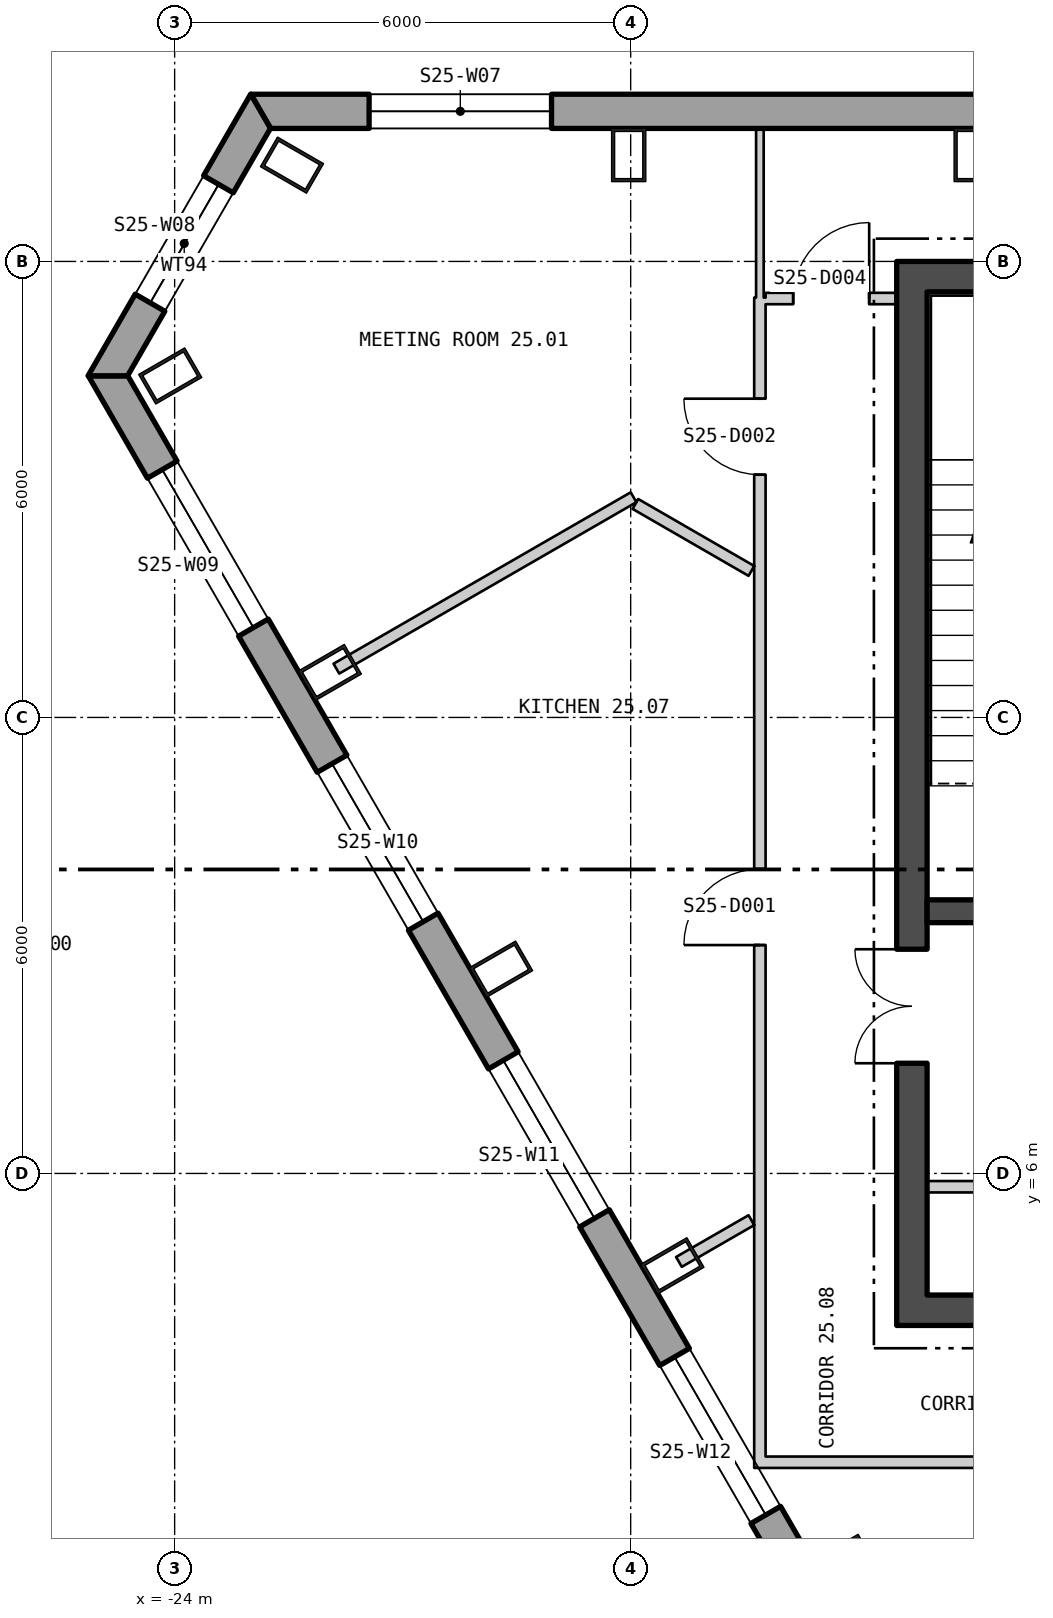
"""IFC4 building model, lengths in metres.
Left out: names, types, materials, properties, quantities, classifications, styles, units other than length and angle.
Written with IfcOpenShell. Run it as: python <this file> out.ifc"""

import sys

from ifc_helpers import new_model, si_unit, direction, frame, frame_2d, origin, origin_2d, place, context, subcontext, project, spatial, polyline, rectangle, hollow_rectangle, outline, extrude, element, fill, save


model = new_model("IFC4")
c1 = context("Model", 3, precision=1e-05, world=origin(), true_north=direction((0.0, 1.0)))
c2 = subcontext(c1, "Body", "Model", "MODEL_VIEW")
j1 = project(units=[si_unit("LENGTHUNIT", "METRE"), si_unit("PLANEANGLEUNIT", "RADIAN")], contexts=[c1])
p1 = place(None, origin())
s1 = spatial("IfcSite", under=j1, at=p1, CompositionType="ELEMENT")
p2 = place(p1, origin())
s2 = spatial("IfcBuilding", under=s1, at=p2, CompositionType="ELEMENT")
p3 = place(p2, frame((0.0, 0.0, 321.0)))
s3 = spatial("IfcBuildingStorey", under=s2, at=p3, CompositionType="ELEMENT", Elevation=321.0)
for number, where, z_axis, x_axis in (
    (1, (-13.52, 19.4, 0.0), (0.0, 0.0, 1.0), (-1.0, 0.0, 0.0)),
    (2, (-18.026, 19.4, 0.0), (0.0, 0.0, 1.0), (-1.0, 0.0, 0.0)),
    (3, (-22.456, 19.267, 0.0), (0.0, 0.0, 1.0), (-0.5, -0.866, 0.0)),
    (4, (-24.058, 16.493, 0.0), (0.0, 0.0, 1.0), (0.5, -0.866, 0.0)),
    (5, (-21.958, 12.591, 0.0), (0.0, 0.0, 1.0), (0.5, -0.866, 0.0)),
    (6, (-19.705, 8.688, 0.0), (0.0, 0.0, 1.0), (0.5, -0.866, 0.0)),
    (7, (-17.451, 4.785, 0.0), (0.0, 0.0, 1.0), (0.5, -0.866, 0.0)),
    (8, (-15.198, 0.882, 0.0), (0.0, 0.0, 1.0), (0.5, -0.866, 0.0)),
):
    element("IfcColumn", number, at=place(p3, frame(where, z_axis=z_axis, x_axis=x_axis)), inside=s3, PredefinedType="COLUMN", context=c2, shape_type="SweptSolid", body=[
        extrude(hollow_rectangle(XDim=0.45, YDim=0.7, WallThickness=0.04, at=origin_2d()), origin(), (0.0, 0.0, 1.0), 4.2),
    ])
p4 = place(p3, frame((22.865, 19.975, -0.4), z_axis=(0.0, 0.0, 1.0), x_axis=(-1.0, 0.0, 0.0)))
e9 = element("IfcWall", 9, at=p4, inside=s3, PredefinedType="SOLIDWALL", context=c2, shape_type="SweptSolid", body=[
    extrude(outline(polyline([(-0.13, -0.225), (45.86, -0.225), (45.6, 0.225), (0.13, 0.225), (-0.13, -0.225)])), origin(), (0.0, 0.0, 1.0), 4.2),
])
p5 = place(p4, frame((1.424, 0.0, 1.3)))
e10 = element("IfcOpeningElement", 10, at=p5, cuts=e9, PredefinedType="OPENING", context=c2, shape_type="SweptSolid", body=[
    extrude(rectangle(XDim=2.4, YDim=2.3, at=frame_2d((1.2, 1.15))), frame((0.0, 0.235, 0.0), z_axis=(0.0, -1.0, 0.0), x_axis=(1.0, 0.0, 0.0)), (0.0, 0.0, 1.0), 0.47),
])
p6 = place(p4, frame((14.905, 0.0, 1.3)))
e11 = element("IfcOpeningElement", 11, at=p6, cuts=e9, PredefinedType="OPENING", context=c2, shape_type="SweptSolid", body=[
    extrude(rectangle(XDim=2.4, YDim=2.3, at=frame_2d((1.2, 1.15))), frame((0.0, 0.235, 0.0), z_axis=(0.0, -1.0, 0.0), x_axis=(1.0, 0.0, 0.0)), (0.0, 0.0, 1.0), 0.47),
])
p7 = place(p4, frame((19.412, 0.0, 1.3)))
e12 = element("IfcOpeningElement", 12, at=p7, cuts=e9, PredefinedType="OPENING", context=c2, shape_type="SweptSolid", body=[
    extrude(rectangle(XDim=2.4, YDim=2.3, at=frame_2d((1.2, 1.15))), frame((0.0, 0.235, 0.0), z_axis=(0.0, -1.0, 0.0), x_axis=(1.0, 0.0, 0.0)), (0.0, 0.0, 1.0), 0.47),
])
p8 = place(p4, frame((23.918, 0.0, 1.3)))
e13 = element("IfcOpeningElement", 13, at=p8, cuts=e9, PredefinedType="OPENING", context=c2, shape_type="SweptSolid", body=[
    extrude(rectangle(XDim=2.4, YDim=2.3, at=frame_2d((1.2, 1.15))), frame((0.0, 0.235, 0.0), z_axis=(0.0, -1.0, 0.0), x_axis=(1.0, 0.0, 0.0)), (0.0, 0.0, 1.0), 0.47),
])
p9 = place(p4, frame((28.425, 0.0, 1.3)))
e14 = element("IfcOpeningElement", 14, at=p9, cuts=e9, PredefinedType="OPENING", context=c2, shape_type="SweptSolid", body=[
    extrude(rectangle(XDim=2.4, YDim=2.3, at=frame_2d((1.2, 1.15))), frame((0.0, 0.235, 0.0), z_axis=(0.0, -1.0, 0.0), x_axis=(1.0, 0.0, 0.0)), (0.0, 0.0, 1.0), 0.47),
])
p10 = place(p4, frame((32.932, 0.0, 1.3)))
e15 = element("IfcOpeningElement", 15, at=p10, cuts=e9, PredefinedType="OPENING", context=c2, shape_type="SweptSolid", body=[
    extrude(rectangle(XDim=2.4, YDim=2.3, at=frame_2d((1.2, 1.15))), frame((0.0, 0.235, 0.0), z_axis=(0.0, -1.0, 0.0), x_axis=(1.0, 0.0, 0.0)), (0.0, 0.0, 1.0), 0.47),
])
p11 = place(p4, frame((41.907, 0.0, 1.3)))
e16 = element("IfcOpeningElement", 16, at=p11, cuts=e9, PredefinedType="OPENING", context=c2, shape_type="SweptSolid", body=[
    extrude(rectangle(XDim=2.4, YDim=2.3, at=frame_2d((1.2, 1.15))), frame((0.0, 0.235, 0.0), z_axis=(0.0, -1.0, 0.0), x_axis=(1.0, 0.0, 0.0)), (0.0, 0.0, 1.0), 0.47),
])
p12 = place(p3, frame((-22.869, 19.977, -0.4), z_axis=(0.0, 0.0, 1.0), x_axis=(-0.499999496815, -0.866025694299, 0.0)))
e17 = element("IfcWall", 17, at=p12, inside=s3, PredefinedType="SOLIDWALL", context=c2, shape_type="SweptSolid", body=[
    extrude(outline(polyline([(-0.13, -0.225), (4.15, -0.225), (3.89, 0.225), (0.13, 0.225), (-0.13, -0.225)])), origin(), (0.0, 0.0, 1.0), 4.2),
])
p13 = place(p12, frame((1.11, 0.0, 1.3)))
e18 = element("IfcOpeningElement", 18, at=p13, cuts=e17, PredefinedType="OPENING", context=c2, shape_type="SweptSolid", body=[
    extrude(rectangle(XDim=1.8, YDim=2.3, at=frame_2d((0.9, 1.15))), frame((0.0, 0.235, 0.0), z_axis=(0.0, -1.0, 0.0), x_axis=(1.0, 0.0, 0.0)), (0.0, 0.0, 1.0), 0.47),
])
p14 = place(p3, frame((-24.875, 16.493, -0.18), z_axis=(0.0, 0.0, 1.0), x_axis=(0.500000141277, -0.866025322218, 0.0)))
e19 = element("IfcWall", 19, at=p14, inside=s3, PredefinedType="SOLIDWALL", context=c2, shape_type="SweptSolid", body=[
    extrude(outline(polyline([(-0.13, -0.225), (45.86, -0.225), (45.6, 0.225), (0.13, 0.225), (-0.13, -0.225)])), origin(), (0.0, 0.0, 1.0), 3.98),
])
p15 = place(p14, frame((1.424, 0.0, 1.08)))
e20 = element("IfcOpeningElement", 20, at=p15, cuts=e19, PredefinedType="OPENING", context=c2, shape_type="SweptSolid", body=[
    extrude(rectangle(XDim=2.4, YDim=2.3, at=frame_2d((1.2, 1.15))), frame((0.0, 0.235, 0.0), z_axis=(0.0, -1.0, 0.0), x_axis=(1.0, 0.0, 0.0)), (0.0, 0.0, 1.0), 0.47),
])
p16 = place(p14, frame((5.892, 0.0, 1.08)))
e21 = element("IfcOpeningElement", 21, at=p16, cuts=e19, PredefinedType="OPENING", context=c2, shape_type="SweptSolid", body=[
    extrude(rectangle(XDim=2.4, YDim=2.3, at=frame_2d((1.2, 1.15))), frame((0.0, 0.235, 0.0), z_axis=(0.0, -1.0, 0.0), x_axis=(1.0, 0.0, 0.0)), (0.0, 0.0, 1.0), 0.47),
])
p17 = place(p14, frame((10.399, 0.0, 1.08)))
e22 = element("IfcOpeningElement", 22, at=p17, cuts=e19, PredefinedType="OPENING", context=c2, shape_type="SweptSolid", body=[
    extrude(rectangle(XDim=2.4, YDim=2.3, at=frame_2d((1.2, 1.15))), frame((0.0, 0.235, 0.0), z_axis=(0.0, -1.0, 0.0), x_axis=(1.0, 0.0, 0.0)), (0.0, 0.0, 1.0), 0.47),
])
p18 = place(p14, frame((14.905, 0.0, 1.08)))
e23 = element("IfcOpeningElement", 23, at=p18, cuts=e19, PredefinedType="OPENING", context=c2, shape_type="SweptSolid", body=[
    extrude(rectangle(XDim=2.4, YDim=2.3, at=frame_2d((1.2, 1.15))), frame((0.0, 0.235, 0.0), z_axis=(0.0, -1.0, 0.0), x_axis=(1.0, 0.0, 0.0)), (0.0, 0.0, 1.0), 0.47),
])
p19 = place(p14, frame((19.412, 0.0, 1.08)))
e24 = element("IfcOpeningElement", 24, at=p19, cuts=e19, PredefinedType="OPENING", context=c2, shape_type="SweptSolid", body=[
    extrude(rectangle(XDim=2.4, YDim=2.3, at=frame_2d((1.2, 1.15))), frame((0.0, 0.235, 0.0), z_axis=(0.0, -1.0, 0.0), x_axis=(1.0, 0.0, 0.0)), (0.0, 0.0, 1.0), 0.47),
])
p20 = place(p14, frame((23.918, 0.0, 1.08)))
e25 = element("IfcOpeningElement", 25, at=p20, cuts=e19, PredefinedType="OPENING", context=c2, shape_type="SweptSolid", body=[
    extrude(rectangle(XDim=2.4, YDim=2.3, at=frame_2d((1.2, 1.15))), frame((0.0, 0.235, 0.0), z_axis=(0.0, -1.0, 0.0), x_axis=(1.0, 0.0, 0.0)), (0.0, 0.0, 1.0), 0.47),
])
p21 = place(p14, frame((28.425, 0.0, 1.08)))
e26 = element("IfcOpeningElement", 26, at=p21, cuts=e19, PredefinedType="OPENING", context=c2, shape_type="SweptSolid", body=[
    extrude(rectangle(XDim=2.4, YDim=2.3, at=frame_2d((1.2, 1.15))), frame((0.0, 0.235, 0.0), z_axis=(0.0, -1.0, 0.0), x_axis=(1.0, 0.0, 0.0)), (0.0, 0.0, 1.0), 0.47),
])
p22 = place(p14, frame((37.438, 0.0, 1.08)))
e27 = element("IfcOpeningElement", 27, at=p22, cuts=e19, PredefinedType="OPENING", context=c2, shape_type="SweptSolid", body=[
    extrude(rectangle(XDim=2.4, YDim=2.3, at=frame_2d((1.2, 1.15))), frame((0.0, 0.235, 0.0), z_axis=(0.0, -1.0, 0.0), x_axis=(1.0, 0.0, 0.0)), (0.0, 0.0, 1.0), 0.47),
])
p23 = place(p14, frame((41.907, 0.0, 1.08)))
e28 = element("IfcOpeningElement", 28, at=p23, cuts=e19, PredefinedType="OPENING", context=c2, shape_type="SweptSolid", body=[
    extrude(rectangle(XDim=2.4, YDim=2.3, at=frame_2d((1.2, 1.15))), frame((0.0, 0.235, 0.0), z_axis=(0.0, -1.0, 0.0), x_axis=(1.0, 0.0, 0.0)), (0.0, 0.0, 1.0), 0.47),
])
p24 = place(p3, frame((-14.5, 4.2, 0.0), z_axis=(0.0, 0.0, 1.0), x_axis=(1.0, 0.0, 0.0)))
e29 = element("IfcWall", 29, at=p24, inside=s3, PredefinedType="SHEAR", context=c2, shape_type="SweptSolid", body=[
    extrude(rectangle(XDim=29.0, YDim=0.4, at=frame_2d((14.5, 0.0))), origin(), (0.0, 0.0, 1.0), 4.0),
])
p25 = place(p24, frame((9.0, 0.0, 0.0)))
e30 = element("IfcOpeningElement", 30, at=p25, cuts=e29, PredefinedType="OPENING", context=c2, shape_type="SweptSolid", body=[
    extrude(rectangle(XDim=1.8, YDim=2.4, at=frame_2d((0.9, 1.2))), frame((0.0, 0.21, 0.0), z_axis=(0.0, -1.0, 0.0), x_axis=(1.0, 0.0, 0.0)), (0.0, 0.0, 1.0), 0.42),
])
p26 = place(p24, frame((19.0, 0.0, 0.0)))
e31 = element("IfcOpeningElement", 31, at=p26, cuts=e29, PredefinedType="OPENING", context=c2, shape_type="SweptSolid", body=[
    extrude(rectangle(XDim=1.8, YDim=2.4, at=frame_2d((0.9, 1.2))), frame((0.0, 0.21, 0.0), z_axis=(0.0, -1.0, 0.0), x_axis=(1.0, 0.0, 0.0)), (0.0, 0.0, 1.0), 0.42),
])
p27 = place(p3, frame((-14.5, 17.8, 0.0), z_axis=(0.0, 0.0, 1.0), x_axis=(1.0, 0.0, 0.0)))
e32 = element("IfcWall", 32, at=p27, inside=s3, PredefinedType="SHEAR", context=c2, shape_type="SweptSolid", body=[
    extrude(rectangle(XDim=29.0, YDim=0.4, at=frame_2d((14.5, 0.0))), origin(), (0.0, 0.0, 1.0), 4.0),
])
p28 = place(p3, frame((-14.3, 4.4, 0.0), z_axis=(0.0, 0.0, 1.0), x_axis=(0.0, 1.0, 0.0)))
e33 = element("IfcWall", 33, at=p28, inside=s3, PredefinedType="SHEAR", context=c2, shape_type="SweptSolid", body=[
    extrude(rectangle(XDim=13.2, YDim=0.4, at=frame_2d((6.6, 0.0))), origin(), (0.0, 0.0, 1.0), 4.0),
])
p29 = place(p28, frame((3.05, 0.0, 0.0)))
e34 = element("IfcOpeningElement", 34, at=p29, cuts=e33, PredefinedType="OPENING", context=c2, shape_type="SweptSolid", body=[
    extrude(rectangle(XDim=1.5, YDim=2.1, at=frame_2d((0.75, 1.05))), frame((0.0, 0.21, 0.0), z_axis=(0.0, -1.0, 0.0), x_axis=(1.0, 0.0, 0.0)), (0.0, 0.0, 1.0), 0.42),
])
p30 = place(p3, frame((-14.1, 9.45, 0.0), z_axis=(0.0, 0.0, 1.0), x_axis=(1.0, 0.0, 0.0)))
e35 = element("IfcWall", 35, at=p30, inside=s3, PredefinedType="SHEAR", context=c2, shape_type="SweptSolid", body=[
    extrude(rectangle(XDim=3.1, YDim=0.3, at=frame_2d((1.55, 0.0))), origin(), (0.0, 0.0, 1.0), 4.0),
])
p31 = place(p30, frame((0.95, 0.0, 0.0)))
e36 = element("IfcOpeningElement", 36, at=p31, cuts=e35, PredefinedType="OPENING", context=c2, shape_type="SweptSolid", body=[
    extrude(rectangle(XDim=1.2, YDim=2.1, at=frame_2d((0.6, 1.05))), frame((0.0, 0.16, 0.0), z_axis=(0.0, -1.0, 0.0), x_axis=(1.0, 0.0, 0.0)), (0.0, 0.0, 1.0), 0.32),
])
p32 = place(p3, frame((-14.1, 5.825, 0.0), z_axis=(0.0, 0.0, 1.0), x_axis=(1.0, 0.0, 0.0)))
e37 = element("IfcWall", 37, at=p32, inside=s3, PredefinedType="PARTITIONING", context=c2, shape_type="SweptSolid", body=[
    extrude(rectangle(XDim=3.1, YDim=0.15, at=frame_2d((1.55, 0.0))), origin(), (0.0, 0.0, 1.0), 4.0),
])
p33 = place(p3, frame((-21.872, 12.642, 0.0), z_axis=(0.0, 0.0, 1.0), x_axis=(0.866259344548, 0.499594583621, 0.0)))
e38 = element("IfcWall", 38, at=p33, inside=s3, PredefinedType="PARTITIONING", context=c2, shape_type="SweptSolid", body=[
    extrude(rectangle(XDim=4.514, YDim=0.15, at=frame_2d((2.257, 0.0))), origin(), (0.0, 0.0, 1.0), 4.0),
])
p34 = place(p3, frame((-17.938, 14.809, 0.0), z_axis=(0.0, 0.0, 1.0), x_axis=(0.866034375916, -0.49998445949, 0.0)))
e39 = element("IfcWall", 39, at=p34, inside=s3, PredefinedType="PARTITIONING", context=c2, shape_type="SweptSolid", body=[
    extrude(rectangle(XDim=1.762, YDim=0.15, at=frame_2d((0.881, 0.0))), origin(), (0.0, 0.0, 1.0), 4.0),
])
p35 = place(p3, frame((-17.365, 4.836, 0.0), z_axis=(0.0, 0.0, 1.0), x_axis=(0.86650329071, 0.499171360545, 0.0)))
e40 = element("IfcWall", 40, at=p35, inside=s3, PredefinedType="PARTITIONING", context=c2, shape_type="SweptSolid", body=[
    extrude(rectangle(XDim=1.1, YDim=0.15, at=frame_2d((0.55, 0.0))), origin(), (0.0, 0.0, 1.0), 4.0),
])
p36 = place(p3, frame((-16.3, 2.125, 0.0), z_axis=(0.0, 0.0, 1.0), x_axis=(0.0, 1.0, 0.0)))
e41 = element("IfcWall", 41, at=p36, inside=s3, PredefinedType="PARTITIONING", context=c2, shape_type="SweptSolid", body=[
    extrude(rectangle(XDim=15.399, YDim=0.15, at=frame_2d((7.699, 0.0))), origin(), (0.0, 0.0, 1.0), 4.0),
])
p37 = place(p36, frame((6.88, 0.0, 0.0)))
e42 = element("IfcOpeningElement", 42, at=p37, cuts=e41, PredefinedType="OPENING", context=c2, shape_type="SweptSolid", body=[
    extrude(rectangle(XDim=1.0, YDim=2.1, at=frame_2d((0.5, 1.05))), frame((0.0, 0.085, 0.0), z_axis=(0.0, -1.0, 0.0), x_axis=(1.0, 0.0, 0.0)), (0.0, 0.0, 1.0), 0.17),
])
p38 = place(p36, frame((13.069, 0.0, 0.0)))
e43 = element("IfcOpeningElement", 43, at=p38, cuts=e41, PredefinedType="OPENING", context=c2, shape_type="SweptSolid", body=[
    extrude(rectangle(XDim=1.0, YDim=2.1, at=frame_2d((0.5, 1.05))), frame((0.0, 0.085, 0.0), z_axis=(0.0, -1.0, 0.0), x_axis=(1.0, 0.0, 0.0)), (0.0, 0.0, 1.0), 0.17),
])
p39 = place(p3, frame((-16.3, 17.524, 0.0), z_axis=(0.0, 0.0, 1.0), x_axis=(0.0, 1.0, 0.0)))
e44 = element("IfcWall", 44, at=p39, inside=s3, PredefinedType="PARTITIONING", context=c2, shape_type="SweptSolid", body=[
    extrude(rectangle(XDim=2.224, YDim=0.1, at=frame_2d((1.112, 0.0))), origin(), (0.0, 0.0, 1.0), 4.0),
])
p40 = place(p3, frame((-16.225, 2.2, 0.0), z_axis=(0.0, 0.0, 1.0), x_axis=(1.0, 0.0, 0.0)))
e45 = element("IfcWall", 45, at=p40, inside=s3, PredefinedType="PARTITIONING", context=c2, shape_type="SweptSolid", body=[
    extrude(rectangle(XDim=8.68, YDim=0.15, at=frame_2d((4.34, 0.0))), origin(), (0.0, 0.0, 1.0), 4.0),
])
p41 = place(p40, frame((3.765, 0.0, 0.0)))
e46 = element("IfcOpeningElement", 46, at=p41, cuts=e45, PredefinedType="OPENING", context=c2, shape_type="SweptSolid", body=[
    extrude(rectangle(XDim=1.0, YDim=2.1, at=frame_2d((0.5, 1.05))), frame((0.0, 0.085, 0.0), z_axis=(0.0, -1.0, 0.0), x_axis=(1.0, 0.0, 0.0)), (0.0, 0.0, 1.0), 0.17),
])
p42 = place(p3, frame((-16.225, 17.512, 0.0), z_axis=(0.0, 0.0, 1.0), x_axis=(1.0, 0.0, 0.0)))
e47 = element("IfcWall", 47, at=p42, inside=s3, PredefinedType="PARTITIONING", context=c2, shape_type="SweptSolid", body=[
    extrude(rectangle(XDim=1.725, YDim=0.15, at=frame_2d((0.863, 0.0))), origin(), (0.0, 0.0, 1.0), 4.0),
])
p43 = place(p42, frame((0.363, 0.0, 0.0)))
e48 = element("IfcOpeningElement", 48, at=p43, cuts=e47, PredefinedType="OPENING", context=c2, shape_type="SweptSolid", body=[
    extrude(rectangle(XDim=1.0, YDim=2.1, at=frame_2d((0.5, 1.05))), frame((0.0, 0.085, 0.0), z_axis=(0.0, -1.0, 0.0), x_axis=(1.0, 0.0, 0.0)), (0.0, 0.0, 1.0), 0.17),
])
p44 = place(p11, origin())
e49 = element("IfcWindow", 49, at=p44, inside=s3, PartitioningType="SINGLE_PANEL", PredefinedType="WINDOW", context=c2, shape_type="SweptSolid", body=[
    extrude(rectangle(XDim=2.4, YDim=2.3, at=frame_2d((1.2, 1.15))), frame((0.0, 0.105, 0.0), z_axis=(0.0, -1.0, 0.0), x_axis=(1.0, 0.0, 0.0)), (0.0, 0.0, 1.0), 0.06),
])
fill(e16, e49)
p45 = place(p13, origin())
e50 = element("IfcWindow", 50, at=p45, inside=s3, PartitioningType="SINGLE_PANEL", PredefinedType="WINDOW", context=c2, shape_type="SweptSolid", body=[
    extrude(rectangle(XDim=1.8, YDim=2.3, at=frame_2d((0.9, 1.15))), frame((0.0, 0.105, 0.0), z_axis=(0.0, -1.0, 0.0), x_axis=(1.0, 0.0, 0.0)), (0.0, 0.0, 1.0), 0.06),
])
fill(e18, e50)
p46 = place(p15, origin())
e51 = element("IfcWindow", 51, at=p46, inside=s3, PartitioningType="SINGLE_PANEL", PredefinedType="WINDOW", context=c2, shape_type="SweptSolid", body=[
    extrude(rectangle(XDim=2.4, YDim=2.3, at=frame_2d((1.2, 1.15))), frame((0.0, 0.105, 0.0), z_axis=(0.0, -1.0, 0.0), x_axis=(1.0, 0.0, 0.0)), (0.0, 0.0, 1.0), 0.06),
])
fill(e20, e51)
p47 = place(p16, origin())
e52 = element("IfcWindow", 52, at=p47, inside=s3, PartitioningType="SINGLE_PANEL", PredefinedType="WINDOW", context=c2, shape_type="SweptSolid", body=[
    extrude(rectangle(XDim=2.4, YDim=2.3, at=frame_2d((1.2, 1.15))), frame((0.0, 0.105, 0.0), z_axis=(0.0, -1.0, 0.0), x_axis=(1.0, 0.0, 0.0)), (0.0, 0.0, 1.0), 0.06),
])
fill(e21, e52)
p48 = place(p17, origin())
e53 = element("IfcWindow", 53, at=p48, inside=s3, PartitioningType="SINGLE_PANEL", PredefinedType="WINDOW", context=c2, shape_type="SweptSolid", body=[
    extrude(rectangle(XDim=2.4, YDim=2.3, at=frame_2d((1.2, 1.15))), frame((0.0, 0.105, 0.0), z_axis=(0.0, -1.0, 0.0), x_axis=(1.0, 0.0, 0.0)), (0.0, 0.0, 1.0), 0.06),
])
fill(e22, e53)
p49 = place(p18, origin())
e54 = element("IfcWindow", 54, at=p49, inside=s3, PartitioningType="SINGLE_PANEL", PredefinedType="WINDOW", context=c2, shape_type="SweptSolid", body=[
    extrude(rectangle(XDim=2.4, YDim=2.3, at=frame_2d((1.2, 1.15))), frame((0.0, 0.105, 0.0), z_axis=(0.0, -1.0, 0.0), x_axis=(1.0, 0.0, 0.0)), (0.0, 0.0, 1.0), 0.06),
])
fill(e23, e54)
p50 = place(p29, origin())
e55 = element("IfcDoor", 55, at=p50, inside=s3, OperationType="DOUBLE_DOOR_SINGLE_SWING", PredefinedType="DOOR", context=c2, shape_type="SweptSolid", body=[
    extrude(rectangle(XDim=1.5, YDim=2.1, at=frame_2d((0.75, 1.05))), frame((0.0, 0.025, 0.0), z_axis=(0.0, -1.0, 0.0), x_axis=(1.0, 0.0, 0.0)), (0.0, 0.0, 1.0), 0.05),
])
fill(e34, e55)
p51 = place(p37, origin())
e56 = element("IfcDoor", 56, at=p51, inside=s3, OperationType="SINGLE_SWING_RIGHT", PredefinedType="DOOR", context=c2, shape_type="SweptSolid", body=[
    extrude(rectangle(XDim=1.0, YDim=2.1, at=frame_2d((0.5, 1.05))), frame((0.0, 0.025, 0.0), z_axis=(0.0, -1.0, 0.0), x_axis=(1.0, 0.0, 0.0)), (0.0, 0.0, 1.0), 0.05),
])
fill(e42, e56)
p52 = place(p38, origin())
e57 = element("IfcDoor", 57, at=p52, inside=s3, OperationType="SINGLE_SWING_LEFT", PredefinedType="DOOR", context=c2, shape_type="SweptSolid", body=[
    extrude(rectangle(XDim=1.0, YDim=2.1, at=frame_2d((0.5, 1.05))), frame((0.0, 0.025, 0.0), z_axis=(0.0, -1.0, 0.0), x_axis=(1.0, 0.0, 0.0)), (0.0, 0.0, 1.0), 0.05),
])
fill(e43, e57)
p53 = place(p43, origin())
e58 = element("IfcDoor", 58, at=p53, inside=s3, OperationType="SINGLE_SWING_LEFT", PredefinedType="DOOR", context=c2, shape_type="SweptSolid", body=[
    extrude(rectangle(XDim=1.0, YDim=2.1, at=frame_2d((0.5, 1.05))), frame((0.0, 0.025, 0.0), z_axis=(0.0, -1.0, 0.0), x_axis=(1.0, 0.0, 0.0)), (0.0, 0.0, 1.0), 0.05),
])
fill(e48, e58)
save(model, sys.argv[1])
